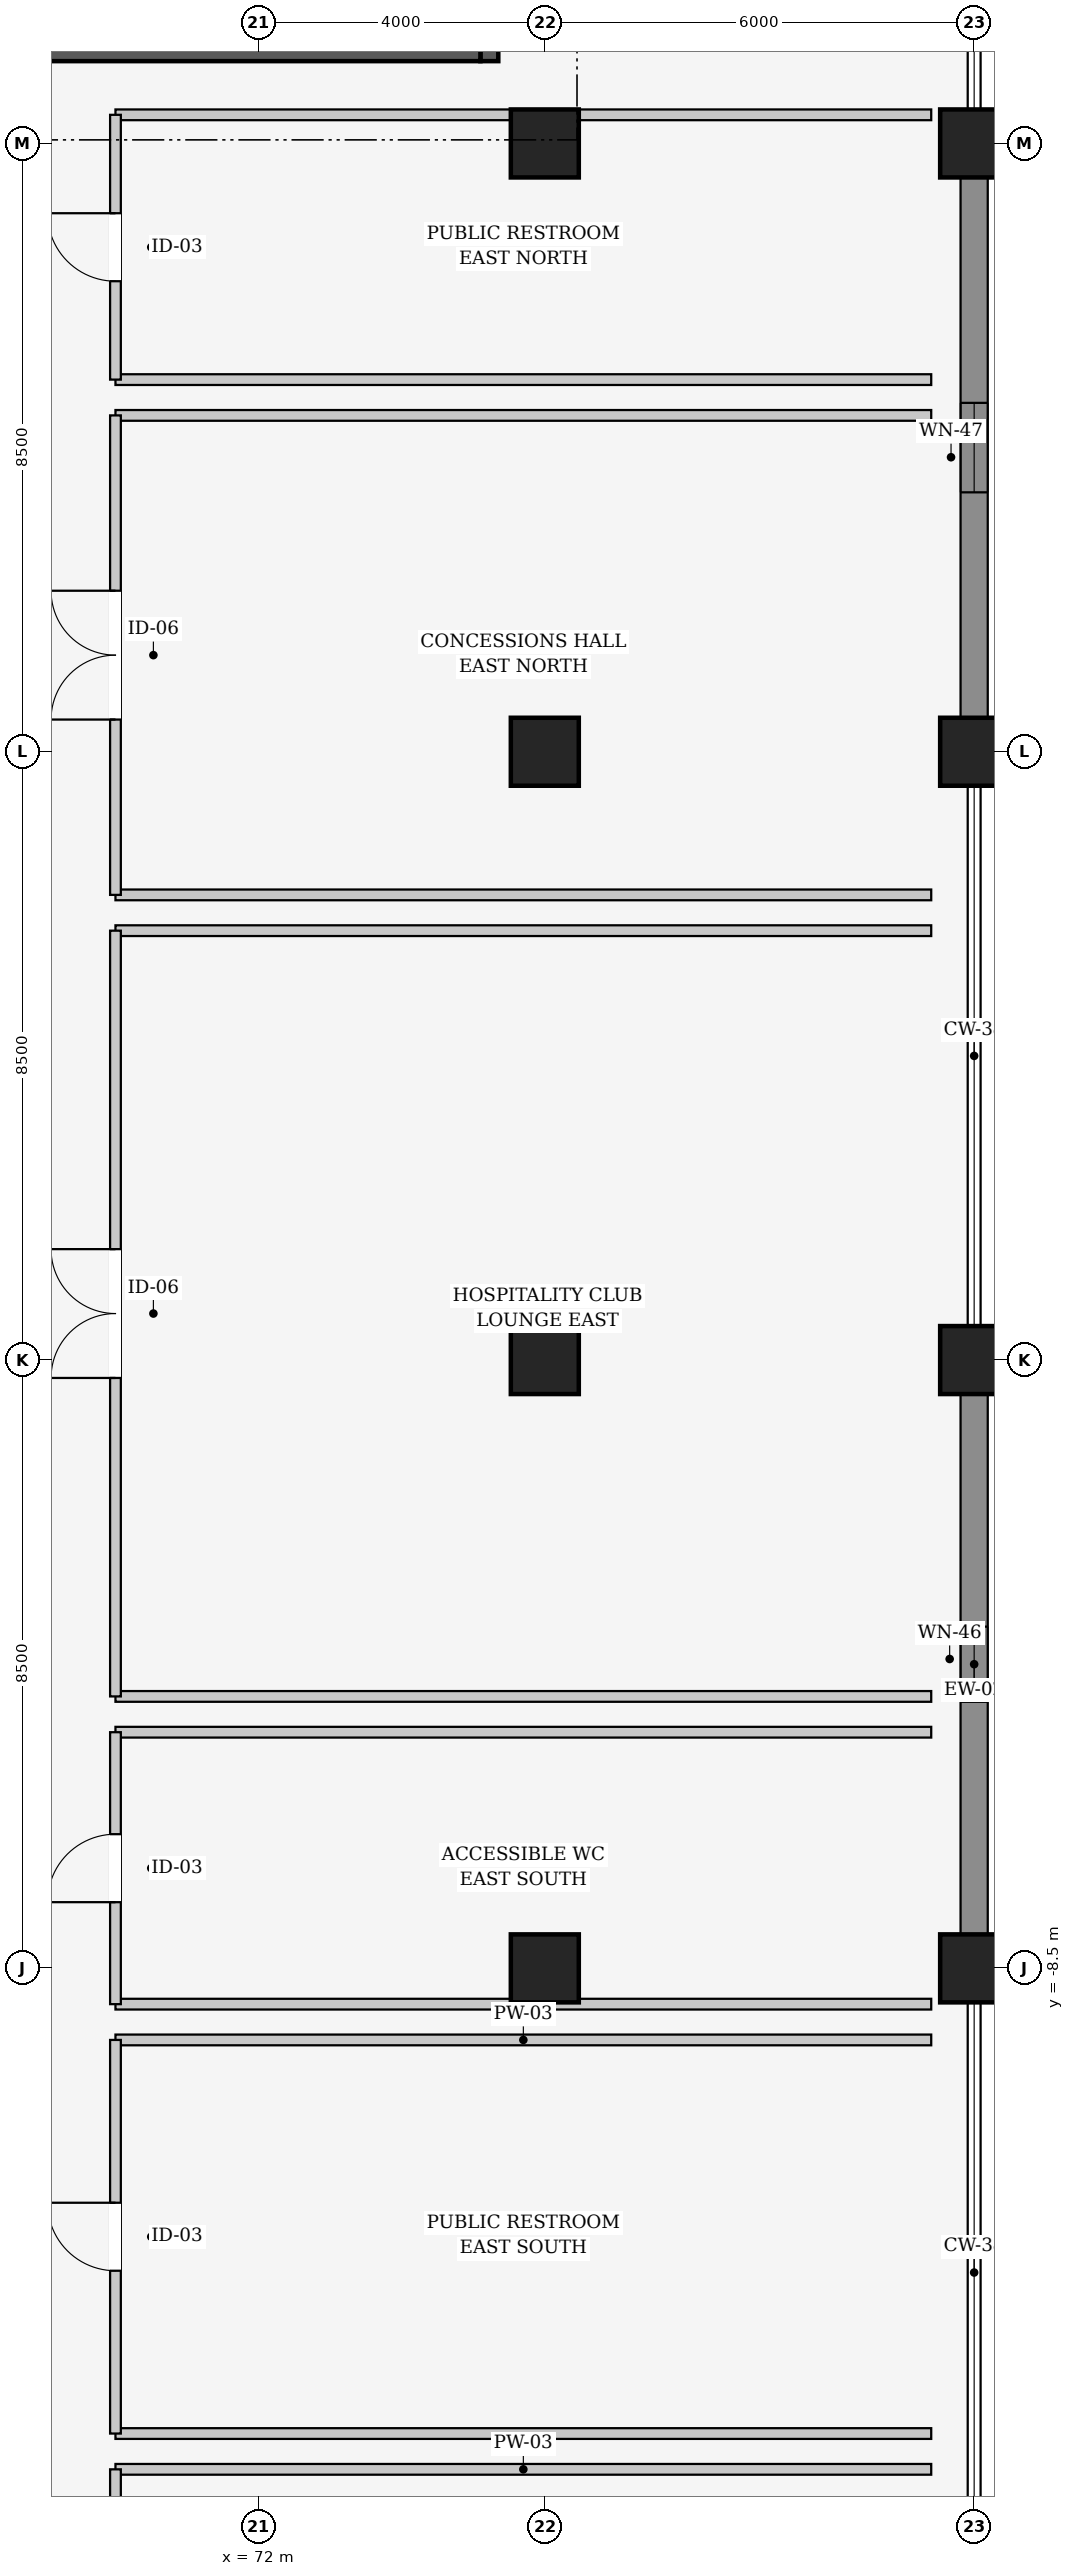
"""IFC4 building model, lengths in metres.
Left out: names, types, materials, properties, quantities, classifications, styles, units other than length and angle.
Written with IfcOpenShell. Run it as: python <this file> out.ifc"""

import sys

from ifc_helpers import new_model, si_unit, direction, frame, frame_2d, origin, origin_2d, place, context, subcontext, project, spatial, rectangle, extrude, element, fill, save


model = new_model("IFC4")
c1 = context("Model", 3, precision=1e-05, world=origin(), true_north=direction((0.0, 1.0)))
c2 = subcontext(c1, "Body", "Model", "MODEL_VIEW")
j1 = project(units=[si_unit("LENGTHUNIT", "METRE"), si_unit("PLANEANGLEUNIT", "RADIAN")], contexts=[c1])
p1 = place(None, origin())
s1 = spatial("IfcSite", under=j1, at=p1, CompositionType="ELEMENT")
p2 = place(p1, origin())
s2 = spatial("IfcBuilding", under=s1, at=p2, CompositionType="ELEMENT")
p3 = place(p2, frame((0.0, 0.0, 6.0)))
s3 = spatial("IfcBuildingStorey", under=s2, at=p3, CompositionType="ELEMENT", Elevation=6.0)
for number, where, z_axis, x_axis in (
    (1, (76.0, -8.5, 0.0), (0.0, 0.0, 1.0), (1.0, 0.0, 0.0)),
    (2, (76.0, 0.0, 0.0), (0.0, 0.0, 1.0), (1.0, 0.0, 0.0)),
    (3, (76.0, 8.5, 0.0), (0.0, 0.0, 1.0), (1.0, 0.0, 0.0)),
    (4, (76.0, 17.0, 0.0), (0.0, 0.0, 1.0), (1.0, 0.0, 0.0)),
    (5, (82.0, -8.5, 0.0), (0.0, 0.0, 1.0), (1.0, 0.0, 0.0)),
    (6, (82.0, 0.0, 0.0), (0.0, 0.0, 1.0), (1.0, 0.0, 0.0)),
    (7, (82.0, 8.5, 0.0), (0.0, 0.0, 1.0), (1.0, 0.0, 0.0)),
    (8, (82.0, 17.0, 0.0), (0.0, 0.0, 1.0), (1.0, 0.0, 0.0)),
):
    element("IfcColumn", number, at=place(p3, frame(where, z_axis=z_axis, x_axis=x_axis)), inside=s3, PredefinedType="COLUMN", context=c2, shape_type="SweptSolid", body=[
        extrude(rectangle(XDim=0.95, YDim=0.95, at=origin_2d()), origin(), (0.0, 0.0, 1.0), 5.4),
    ])
p4 = place(p3, frame((82.0, -0.457, 0.0), z_axis=(0.0, 0.0, 1.0), x_axis=(0.0, -1.0, 0.0)))
e9 = element("IfcWall", 9, at=p4, inside=s3, PredefinedType="SOLIDWALL", context=c2, shape_type="SweptSolid", body=[
    extrude(rectangle(XDim=7.586, YDim=0.38, at=frame_2d((3.793, 0.0))), origin(), (0.0, 0.0, 1.0), 4.46),
])
p5 = place(p4, frame((3.268, 0.0, 0.9)))
e10 = element("IfcOpeningElement", 10, at=p5, cuts=e9, PredefinedType="OPENING", context=c2, shape_type="SweptSolid", body=[
    extrude(rectangle(XDim=1.05, YDim=2.5, at=frame_2d((0.525, 1.25))), frame((0.0, 0.2, 0.0), z_axis=(0.0, -1.0, 0.0), x_axis=(1.0, 0.0, 0.0)), (0.0, 0.0, 1.0), 0.4),
])
p6 = place(p3, frame((82.0, 16.543, 0.0), z_axis=(0.0, 0.0, 1.0), x_axis=(0.0, -1.0, 0.0)))
e11 = element("IfcWall", 11, at=p6, inside=s3, PredefinedType="SOLIDWALL", context=c2, shape_type="SweptSolid", body=[
    extrude(rectangle(XDim=7.586, YDim=0.38, at=frame_2d((3.793, 0.0))), origin(), (0.0, 0.0, 1.0), 4.46),
])
p7 = place(p6, frame((3.168, 0.0, 0.9)))
e12 = element("IfcOpeningElement", 12, at=p7, cuts=e11, PredefinedType="OPENING", context=c2, shape_type="SweptSolid", body=[
    extrude(rectangle(XDim=1.25, YDim=2.5, at=frame_2d((0.625, 1.25))), frame((0.0, 0.2, 0.0), z_axis=(0.0, -1.0, 0.0), x_axis=(1.0, 0.0, 0.0)), (0.0, 0.0, 1.0), 0.4),
])
p8 = place(p3, frame((75.225, 23.85, 0.0), z_axis=(0.0, 0.0, 1.0), x_axis=(0.0, -1.0, 0.0)))
e13 = element("IfcWall", 13, at=p8, inside=s3, PredefinedType="SHEAR", context=c2, shape_type="SweptSolid", body=[
    extrude(rectangle(XDim=5.7, YDim=0.25, at=frame_2d((2.85, 0.0))), origin(), (0.0, 0.0, 1.0), 5.4),
])
p9 = place(p3, frame((75.1, 18.275, 0.0), z_axis=(0.0, 0.0, 1.0), x_axis=(-1.0, 0.0, 0.0)))
e14 = element("IfcWall", 14, at=p9, inside=s3, PredefinedType="SHEAR", context=c2, shape_type="SweptSolid", body=[
    extrude(rectangle(XDim=10.2, YDim=0.25, at=frame_2d((5.1, 0.0))), origin(), (0.0, 0.0, 1.0), 5.4),
])
p10 = place(p3, frame((70.0, -15.5, 0.0), z_axis=(0.0, 0.0, 1.0), x_axis=(1.0, 0.0, 0.0)))
e15 = element("IfcWall", 15, at=p10, inside=s3, PredefinedType="PARTITIONING", context=c2, shape_type="SweptSolid", body=[
    extrude(rectangle(XDim=11.4, YDim=0.15, at=frame_2d((5.7, 0.0))), origin(), (0.0, 0.0, 1.0), 4.445),
])
p11 = place(p3, frame((70.0, -24.4, 0.0), z_axis=(0.0, 0.0, 1.0), x_axis=(0.0, 1.0, 0.0)))
e16 = element("IfcWall", 16, at=p11, inside=s3, PredefinedType="PARTITIONING", context=c2, shape_type="SweptSolid", body=[
    extrude(rectangle(XDim=8.9, YDim=0.15, at=frame_2d((4.45, 0.0))), origin(), (0.0, 0.0, 1.0), 4.145),
])
p12 = place(p11, frame((3.55, 0.0, 0.0)))
e17 = element("IfcOpeningElement", 17, at=p12, cuts=e16, PredefinedType="OPENING", context=c2, shape_type="SweptSolid", body=[
    extrude(rectangle(XDim=1.8, YDim=2.2, at=frame_2d((0.9, 1.1))), frame((0.0, 0.085, 0.0), z_axis=(0.0, -1.0, 0.0), x_axis=(1.0, 0.0, 0.0)), (0.0, 0.0, 1.0), 0.17),
])
for number, where, z_axis, x_axis in (
    (18, (70.0, -9.5, 0.0), (0.0, 0.0, 1.0), (1.0, 0.0, 0.0)),
    (19, (81.4, -15.0, 0.0), (0.0, 0.0, 1.0), (-1.0, 0.0, 0.0)),
):
    element("IfcWall", number, at=place(p3, frame(where, z_axis=z_axis, x_axis=x_axis)), inside=s3, PredefinedType="PARTITIONING", context=c2, shape_type="SweptSolid", body=[
        extrude(rectangle(XDim=11.4, YDim=0.15, at=frame_2d((5.7, 0.0))), origin(), (0.0, 0.0, 1.0), 4.445),
    ])
p13 = place(p3, frame((70.0, -15.0, 0.0), z_axis=(0.0, 0.0, 1.0), x_axis=(0.0, 1.0, 0.0)))
e20 = element("IfcWall", 20, at=p13, inside=s3, PredefinedType="PARTITIONING", context=c2, shape_type="SweptSolid", body=[
    extrude(rectangle(XDim=5.5, YDim=0.15, at=frame_2d((2.75, 0.0))), origin(), (0.0, 0.0, 1.0), 4.74),
])
p14 = place(p13, frame((2.275, 0.0, 0.0)))
e21 = element("IfcOpeningElement", 21, at=p14, cuts=e20, PredefinedType="OPENING", context=c2, shape_type="SweptSolid", body=[
    extrude(rectangle(XDim=0.95, YDim=2.15, at=frame_2d((0.475, 1.075))), frame((0.0, 0.085, 0.0), z_axis=(0.0, -1.0, 0.0), x_axis=(1.0, 0.0, 0.0)), (0.0, 0.0, 1.0), 0.17),
])
p15 = place(p3, frame((70.0, -5.2, 0.0), z_axis=(0.0, 0.0, 1.0), x_axis=(1.0, 0.0, 0.0)))
e22 = element("IfcWall", 22, at=p15, inside=s3, PredefinedType="PARTITIONING", context=c2, shape_type="SweptSolid", body=[
    extrude(rectangle(XDim=11.4, YDim=0.15, at=frame_2d((5.7, 0.0))), origin(), (0.0, 0.0, 1.0), 4.445),
])
p16 = place(p3, frame((81.4, -9.0, 0.0), z_axis=(0.0, 0.0, 1.0), x_axis=(-1.0, 0.0, 0.0)))
e23 = element("IfcWall", 23, at=p16, inside=s3, PredefinedType="PARTITIONING", context=c2, shape_type="SweptSolid", body=[
    extrude(rectangle(XDim=11.4, YDim=0.15, at=frame_2d((5.7, 0.0))), origin(), (0.0, 0.0, 1.0), 4.145),
])
p17 = place(p3, frame((70.0, -9.0, 0.0), z_axis=(0.0, 0.0, 1.0), x_axis=(0.0, 1.0, 0.0)))
e24 = element("IfcWall", 24, at=p17, inside=s3, PredefinedType="PARTITIONING", context=c2, shape_type="SweptSolid", body=[
    extrude(rectangle(XDim=3.8, YDim=0.15, at=frame_2d((1.9, 0.0))), origin(), (0.0, 0.0, 1.0), 4.145),
])
p18 = place(p17, frame((1.425, 0.0, 0.0)))
e25 = element("IfcOpeningElement", 25, at=p18, cuts=e24, PredefinedType="OPENING", context=c2, shape_type="SweptSolid", body=[
    extrude(rectangle(XDim=0.95, YDim=2.15, at=frame_2d((0.475, 1.075))), frame((0.0, 0.085, 0.0), z_axis=(0.0, -1.0, 0.0), x_axis=(1.0, 0.0, 0.0)), (0.0, 0.0, 1.0), 0.17),
])
for number, where, z_axis, x_axis in (
    (26, (70.0, 6.0, 0.0), (0.0, 0.0, 1.0), (1.0, 0.0, 0.0)),
    (27, (81.4, -4.7, 0.0), (0.0, 0.0, 1.0), (-1.0, 0.0, 0.0)),
):
    element("IfcWall", number, at=place(p3, frame(where, z_axis=z_axis, x_axis=x_axis)), inside=s3, PredefinedType="PARTITIONING", context=c2, shape_type="SweptSolid", body=[
        extrude(rectangle(XDim=11.4, YDim=0.15, at=frame_2d((5.7, 0.0))), origin(), (0.0, 0.0, 1.0), 4.445),
    ])
p19 = place(p3, frame((70.0, -4.7, 0.0), z_axis=(0.0, 0.0, 1.0), x_axis=(0.0, 1.0, 0.0)))
e28 = element("IfcWall", 28, at=p19, inside=s3, PredefinedType="PARTITIONING", context=c2, shape_type="SweptSolid", body=[
    extrude(rectangle(XDim=10.7, YDim=0.15, at=frame_2d((5.35, 0.0))), origin(), (0.0, 0.0, 1.0), 4.145),
])
p20 = place(p19, frame((4.45, 0.0, 0.0)))
e29 = element("IfcOpeningElement", 29, at=p20, cuts=e28, PredefinedType="OPENING", context=c2, shape_type="SweptSolid", body=[
    extrude(rectangle(XDim=1.8, YDim=2.2, at=frame_2d((0.9, 1.1))), frame((0.0, 0.085, 0.0), z_axis=(0.0, -1.0, 0.0), x_axis=(1.0, 0.0, 0.0)), (0.0, 0.0, 1.0), 0.17),
])
for number, where, z_axis, x_axis in (
    (30, (70.0, 13.2, 0.0), (0.0, 0.0, 1.0), (1.0, 0.0, 0.0)),
    (31, (81.4, 6.5, 0.0), (0.0, 0.0, 1.0), (-1.0, 0.0, 0.0)),
):
    element("IfcWall", number, at=place(p3, frame(where, z_axis=z_axis, x_axis=x_axis)), inside=s3, PredefinedType="PARTITIONING", context=c2, shape_type="SweptSolid", body=[
        extrude(rectangle(XDim=11.4, YDim=0.15, at=frame_2d((5.7, 0.0))), origin(), (0.0, 0.0, 1.0), 4.445),
    ])
p21 = place(p3, frame((70.0, 6.5, 0.0), z_axis=(0.0, 0.0, 1.0), x_axis=(0.0, 1.0, 0.0)))
e32 = element("IfcWall", 32, at=p21, inside=s3, PredefinedType="PARTITIONING", context=c2, shape_type="SweptSolid", body=[
    extrude(rectangle(XDim=6.7, YDim=0.15, at=frame_2d((3.35, 0.0))), origin(), (0.0, 0.0, 1.0), 4.145),
])
p22 = place(p21, frame((2.45, 0.0, 0.0)))
e33 = element("IfcOpeningElement", 33, at=p22, cuts=e32, PredefinedType="OPENING", context=c2, shape_type="SweptSolid", body=[
    extrude(rectangle(XDim=1.8, YDim=2.2, at=frame_2d((0.9, 1.1))), frame((0.0, 0.085, 0.0), z_axis=(0.0, -1.0, 0.0), x_axis=(1.0, 0.0, 0.0)), (0.0, 0.0, 1.0), 0.17),
])
p23 = place(p3, frame((70.0, 17.4, 0.0), z_axis=(0.0, 0.0, 1.0), x_axis=(1.0, 0.0, 0.0)))
e34 = element("IfcWall", 34, at=p23, inside=s3, PredefinedType="PARTITIONING", context=c2, shape_type="SweptSolid", body=[
    extrude(rectangle(XDim=11.4, YDim=0.15, at=frame_2d((5.7, 0.0))), origin(), (0.0, 0.0, 1.0), 4.145),
])
p24 = place(p3, frame((81.4, 13.7, 0.0), z_axis=(0.0, 0.0, 1.0), x_axis=(-1.0, 0.0, 0.0)))
e35 = element("IfcWall", 35, at=p24, inside=s3, PredefinedType="PARTITIONING", context=c2, shape_type="SweptSolid", body=[
    extrude(rectangle(XDim=11.4, YDim=0.15, at=frame_2d((5.7, 0.0))), origin(), (0.0, 0.0, 1.0), 4.445),
])
p25 = place(p3, frame((70.0, 13.7, 0.0), z_axis=(0.0, 0.0, 1.0), x_axis=(0.0, 1.0, 0.0)))
e36 = element("IfcWall", 36, at=p25, inside=s3, PredefinedType="PARTITIONING", context=c2, shape_type="SweptSolid", body=[
    extrude(rectangle(XDim=3.7, YDim=0.15, at=frame_2d((1.85, 0.0))), origin(), (0.0, 0.0, 1.0), 4.145),
])
p26 = place(p25, frame((1.375, 0.0, 0.0)))
e37 = element("IfcOpeningElement", 37, at=p26, cuts=e36, PredefinedType="OPENING", context=c2, shape_type="SweptSolid", body=[
    extrude(rectangle(XDim=0.95, YDim=2.15, at=frame_2d((0.475, 1.075))), frame((0.0, 0.085, 0.0), z_axis=(0.0, -1.0, 0.0), x_axis=(1.0, 0.0, 0.0)), (0.0, 0.0, 1.0), 0.17),
])
p27 = place(p5, origin())
e38 = element("IfcWindow", 38, at=p27, inside=s3, PartitioningType="SINGLE_PANEL", PredefinedType="WINDOW", context=c2, shape_type="SweptSolid", body=[
    extrude(rectangle(XDim=1.05, YDim=2.5, at=frame_2d((0.525, 1.25))), frame((0.0, 0.03, 0.0), z_axis=(0.0, -1.0, 0.0), x_axis=(1.0, 0.0, 0.0)), (0.0, 0.0, 1.0), 0.06),
])
fill(e10, e38)
p28 = place(p7, origin())
e39 = element("IfcWindow", 39, at=p28, inside=s3, PartitioningType="SINGLE_PANEL", PredefinedType="WINDOW", context=c2, shape_type="SweptSolid", body=[
    extrude(rectangle(XDim=1.25, YDim=2.5, at=frame_2d((0.625, 1.25))), frame((0.0, 0.03, 0.0), z_axis=(0.0, -1.0, 0.0), x_axis=(1.0, 0.0, 0.0)), (0.0, 0.0, 1.0), 0.06),
])
fill(e12, e39)
p29 = place(p14, origin())
e40 = element("IfcDoor", 40, at=p29, inside=s3, OperationType="SINGLE_SWING_RIGHT", PredefinedType="DOOR", context=c2, shape_type="SweptSolid", body=[
    extrude(rectangle(XDim=0.95, YDim=2.15, at=frame_2d((0.475, 1.075))), frame((0.0, 0.025, 0.0), z_axis=(0.0, -1.0, 0.0), x_axis=(1.0, 0.0, 0.0)), (0.0, 0.0, 1.0), 0.05),
])
fill(e21, e40)
p30 = place(p18, origin())
e41 = element("IfcDoor", 41, at=p30, inside=s3, OperationType="SINGLE_SWING_LEFT", PredefinedType="DOOR", context=c2, shape_type="SweptSolid", body=[
    extrude(rectangle(XDim=0.95, YDim=2.15, at=frame_2d((0.475, 1.075))), frame((0.0, 0.025, 0.0), z_axis=(0.0, -1.0, 0.0), x_axis=(1.0, 0.0, 0.0)), (0.0, 0.0, 1.0), 0.05),
])
fill(e25, e41)
p31 = place(p20, origin())
e42 = element("IfcDoor", 42, at=p31, inside=s3, OperationType="DOUBLE_DOOR_SINGLE_SWING", PredefinedType="DOOR", context=c2, shape_type="SweptSolid", body=[
    extrude(rectangle(XDim=1.8, YDim=2.2, at=frame_2d((0.9, 1.1))), frame((0.0, 0.025, 0.0), z_axis=(0.0, -1.0, 0.0), x_axis=(1.0, 0.0, 0.0)), (0.0, 0.0, 1.0), 0.05),
])
fill(e29, e42)
p32 = place(p22, origin())
e43 = element("IfcDoor", 43, at=p32, inside=s3, OperationType="DOUBLE_DOOR_SINGLE_SWING", PredefinedType="DOOR", context=c2, shape_type="SweptSolid", body=[
    extrude(rectangle(XDim=1.8, YDim=2.2, at=frame_2d((0.9, 1.1))), frame((0.0, 0.025, 0.0), z_axis=(0.0, -1.0, 0.0), x_axis=(1.0, 0.0, 0.0)), (0.0, 0.0, 1.0), 0.05),
])
fill(e33, e43)
p33 = place(p26, origin())
e44 = element("IfcDoor", 44, at=p33, inside=s3, OperationType="SINGLE_SWING_RIGHT", PredefinedType="DOOR", context=c2, shape_type="SweptSolid", body=[
    extrude(rectangle(XDim=0.95, YDim=2.15, at=frame_2d((0.475, 1.075))), frame((0.0, 0.025, 0.0), z_axis=(0.0, -1.0, 0.0), x_axis=(1.0, 0.0, 0.0)), (0.0, 0.0, 1.0), 0.05),
])
fill(e37, e44)
save(model, sys.argv[1])
